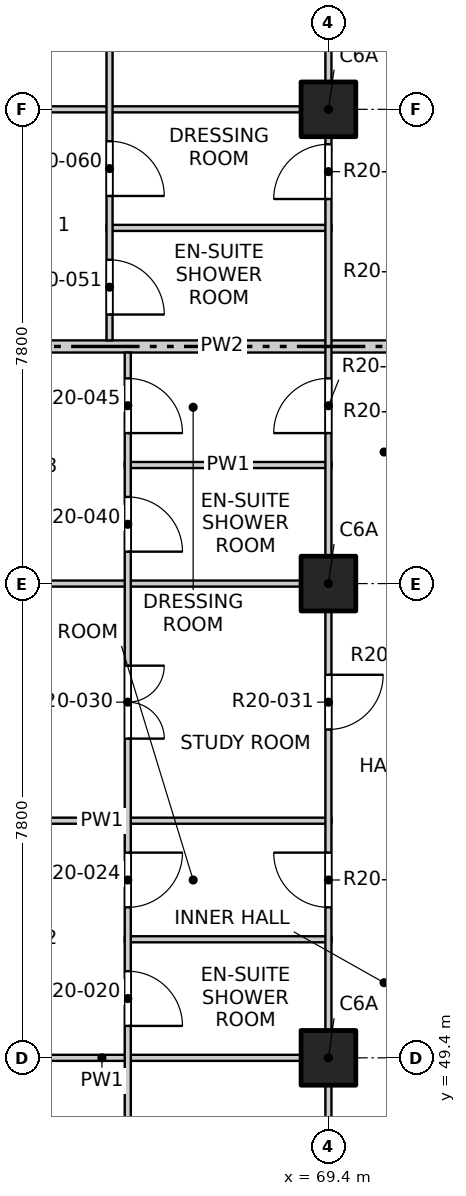
"""IFC4 building model, lengths in metres.
Left out: names, types, materials, properties, quantities, classifications, styles, units other than length and angle.
Written with IfcOpenShell. Run it as: python <this file> out.ifc"""

import sys

from ifc_helpers import new_model, si_unit, direction, frame, frame_2d, origin, origin_2d, place, context, subcontext, project, spatial, rectangle, extrude, element, fill, save


model = new_model("IFC4")
c1 = context("Model", 3, precision=1e-05, world=origin(), true_north=direction((0.0, 1.0)))
c2 = subcontext(c1, "Body", "Model", "MODEL_VIEW")
j1 = project(units=[si_unit("LENGTHUNIT", "METRE"), si_unit("PLANEANGLEUNIT", "RADIAN")], contexts=[c1])
p1 = place(None, origin())
s1 = spatial("IfcSite", under=j1, at=p1, CompositionType="ELEMENT")
p2 = place(p1, origin())
s2 = spatial("IfcBuilding", under=s1, at=p2, CompositionType="ELEMENT")
p3 = place(p2, frame((0.0, 0.0, 210.9)))
s3 = spatial("IfcBuildingStorey", under=s2, at=p3, CompositionType="ELEMENT", Elevation=210.9)
for number, where, z_axis, x_axis in (
    (1, (69.4, 49.4, -0.25), (0.0, 0.0, 1.0), (1.0, 0.0, 0.0)),
    (2, (69.4, 57.2, -0.25), (0.0, 0.0, 1.0), (1.0, 0.0, 0.0)),
    (3, (69.4, 65.0, -0.25), (0.0, 0.0, 1.0), (1.0, 0.0, 0.0)),
):
    element("IfcColumn", number, at=place(p3, frame(where, z_axis=z_axis, x_axis=x_axis)), inside=s3, PredefinedType="COLUMN", context=c2, shape_type="SweptSolid", body=[
        extrude(rectangle(XDim=0.9, YDim=0.9, at=origin_2d()), origin(), (0.0, 0.0, 1.0), 3.4),
    ])
p4 = place(p3, frame((61.9, 49.4, 0.0), z_axis=(0.0, 0.0, 1.0), x_axis=(1.0, 0.0, 0.0)))
e4 = element("IfcWall", 4, at=p4, inside=s3, PredefinedType="PARTITIONING", context=c2, shape_type="SweptSolid", body=[
    extrude(rectangle(XDim=7.55, YDim=0.1, at=frame_2d((3.775, 0.0))), origin(), (0.0, 0.0, 1.0), 3.15),
])
p5 = place(p3, frame((66.05, 51.35, 0.0), z_axis=(0.0, 0.0, 1.0), x_axis=(1.0, 0.0, 0.0)))
e5 = element("IfcWall", 5, at=p5, inside=s3, PredefinedType="PARTITIONING", context=c2, shape_type="SweptSolid", body=[
    extrude(rectangle(XDim=3.4, YDim=0.1, at=frame_2d((1.7, 0.0))), origin(), (0.0, 0.0, 1.0), 3.15),
])
for number, where, z_axis, x_axis in (
    (6, (61.9, 53.3, 0.0), (0.0, 0.0, 1.0), (1.0, 0.0, 0.0)),
    (7, (61.9, 57.2, 0.0), (0.0, 0.0, 1.0), (1.0, 0.0, 0.0)),
):
    element("IfcWall", number, at=place(p3, frame(where, z_axis=z_axis, x_axis=x_axis)), inside=s3, PredefinedType="PARTITIONING", context=c2, shape_type="SweptSolid", body=[
        extrude(rectangle(XDim=7.55, YDim=0.1, at=frame_2d((3.775, 0.0))), origin(), (0.0, 0.0, 1.0), 3.15),
    ])
p6 = place(p3, frame((66.05, 59.15, 0.0), z_axis=(0.0, 0.0, 1.0), x_axis=(1.0, 0.0, 0.0)))
e8 = element("IfcWall", 8, at=p6, inside=s3, PredefinedType="PARTITIONING", context=c2, shape_type="SweptSolid", body=[
    extrude(rectangle(XDim=3.4, YDim=0.1, at=frame_2d((1.7, 0.0))), origin(), (0.0, 0.0, 1.0), 3.15),
])
p7 = place(p3, frame((61.9, 61.1, 0.0), z_axis=(0.0, 0.0, 1.0), x_axis=(1.0, 0.0, 0.0)))
e9 = element("IfcWall", 9, at=p7, inside=s3, PredefinedType="PARTITIONING", context=c2, shape_type="SweptSolid", body=[
    extrude(rectangle(XDim=11.5, YDim=0.2, at=frame_2d((5.75, 0.0))), origin(), (0.0, 0.0, 1.0), 2.55),
])
p8 = place(p3, frame((65.75, 63.05, 0.0), z_axis=(0.0, 0.0, 1.0), x_axis=(1.0, 0.0, 0.0)))
e10 = element("IfcWall", 10, at=p8, inside=s3, PredefinedType="PARTITIONING", context=c2, shape_type="SweptSolid", body=[
    extrude(rectangle(XDim=3.7, YDim=0.1, at=frame_2d((1.85, 0.0))), origin(), (0.0, 0.0, 1.0), 3.15),
])
p9 = place(p3, frame((61.9, 65.0, 0.0), z_axis=(0.0, 0.0, 1.0), x_axis=(1.0, 0.0, 0.0)))
e11 = element("IfcWall", 11, at=p9, inside=s3, PredefinedType="PARTITIONING", context=c2, shape_type="SweptSolid", body=[
    extrude(rectangle(XDim=7.55, YDim=0.1, at=frame_2d((3.775, 0.0))), origin(), (0.0, 0.0, 1.0), 3.15),
])
p10 = place(p3, frame((65.8, 61.2, 0.0), z_axis=(0.0, 0.0, 1.0), x_axis=(0.0, 1.0, 0.0)))
e12 = element("IfcWall", 12, at=p10, inside=s3, PredefinedType="PARTITIONING", context=c2, shape_type="SweptSolid", body=[
    extrude(rectangle(XDim=26.9, YDim=0.1, at=frame_2d((13.45, 0.0))), origin(), (0.0, 0.0, 1.0), 3.15),
])
p11 = place(p10, frame((0.425, 0.0, 0.0)))
e13 = element("IfcOpeningElement", 13, at=p11, cuts=e12, PredefinedType="OPENING", context=c2, shape_type="SweptSolid", body=[
    extrude(rectangle(XDim=0.9, YDim=2.1, at=frame_2d((0.45, 1.05))), frame((0.0, 0.06, 0.0), z_axis=(0.0, -1.0, 0.0), x_axis=(1.0, 0.0, 0.0)), (0.0, 0.0, 1.0), 0.12),
])
p12 = place(p10, frame((2.375, 0.0, 0.0)))
e14 = element("IfcOpeningElement", 14, at=p12, cuts=e12, PredefinedType="OPENING", context=c2, shape_type="SweptSolid", body=[
    extrude(rectangle(XDim=0.9, YDim=2.1, at=frame_2d((0.45, 1.05))), frame((0.0, 0.06, 0.0), z_axis=(0.0, -1.0, 0.0), x_axis=(1.0, 0.0, 0.0)), (0.0, 0.0, 1.0), 0.12),
])
p13 = place(p10, frame((5.15, 0.0, 0.0)))
e15 = element("IfcOpeningElement", 15, at=p13, cuts=e12, PredefinedType="OPENING", context=c2, shape_type="SweptSolid", body=[
    extrude(rectangle(XDim=1.2, YDim=2.1, at=frame_2d((0.6, 1.05))), frame((0.0, 0.06, 0.0), z_axis=(0.0, -1.0, 0.0), x_axis=(1.0, 0.0, 0.0)), (0.0, 0.0, 1.0), 0.12),
])
p14 = place(p10, frame((9.05, 0.0, 0.0)))
e16 = element("IfcOpeningElement", 16, at=p14, cuts=e12, PredefinedType="OPENING", context=c2, shape_type="SweptSolid", body=[
    extrude(rectangle(XDim=1.2, YDim=2.1, at=frame_2d((0.6, 1.05))), frame((0.0, 0.06, 0.0), z_axis=(0.0, -1.0, 0.0), x_axis=(1.0, 0.0, 0.0)), (0.0, 0.0, 1.0), 0.12),
])
p15 = place(p10, frame((12.125, 0.0, 0.0)))
e17 = element("IfcOpeningElement", 17, at=p15, cuts=e12, PredefinedType="OPENING", context=c2, shape_type="SweptSolid", body=[
    extrude(rectangle(XDim=0.9, YDim=2.1, at=frame_2d((0.45, 1.05))), frame((0.0, 0.06, 0.0), z_axis=(0.0, -1.0, 0.0), x_axis=(1.0, 0.0, 0.0)), (0.0, 0.0, 1.0), 0.12),
])
p16 = place(p10, frame((14.075, 0.0, 0.0)))
e18 = element("IfcOpeningElement", 18, at=p16, cuts=e12, PredefinedType="OPENING", context=c2, shape_type="SweptSolid", body=[
    extrude(rectangle(XDim=0.9, YDim=2.1, at=frame_2d((0.45, 1.05))), frame((0.0, 0.06, 0.0), z_axis=(0.0, -1.0, 0.0), x_axis=(1.0, 0.0, 0.0)), (0.0, 0.0, 1.0), 0.12),
])
p17 = place(p10, frame((16.025, 0.0, 0.0)))
e19 = element("IfcOpeningElement", 19, at=p17, cuts=e12, PredefinedType="OPENING", context=c2, shape_type="SweptSolid", body=[
    extrude(rectangle(XDim=0.9, YDim=2.1, at=frame_2d((0.45, 1.05))), frame((0.0, 0.06, 0.0), z_axis=(0.0, -1.0, 0.0), x_axis=(1.0, 0.0, 0.0)), (0.0, 0.0, 1.0), 0.12),
])
p18 = place(p10, frame((17.975, 0.0, 0.0)))
e20 = element("IfcOpeningElement", 20, at=p18, cuts=e12, PredefinedType="OPENING", context=c2, shape_type="SweptSolid", body=[
    extrude(rectangle(XDim=0.9, YDim=2.1, at=frame_2d((0.45, 1.05))), frame((0.0, 0.06, 0.0), z_axis=(0.0, -1.0, 0.0), x_axis=(1.0, 0.0, 0.0)), (0.0, 0.0, 1.0), 0.12),
])
p19 = place(p10, frame((20.75, 0.0, 0.0)))
e21 = element("IfcOpeningElement", 21, at=p19, cuts=e12, PredefinedType="OPENING", context=c2, shape_type="SweptSolid", body=[
    extrude(rectangle(XDim=1.2, YDim=2.1, at=frame_2d((0.6, 1.05))), frame((0.0, 0.06, 0.0), z_axis=(0.0, -1.0, 0.0), x_axis=(1.0, 0.0, 0.0)), (0.0, 0.0, 1.0), 0.12),
])
p20 = place(p10, frame((24.65, 0.0, 0.0)))
e22 = element("IfcOpeningElement", 22, at=p20, cuts=e12, PredefinedType="OPENING", context=c2, shape_type="SweptSolid", body=[
    extrude(rectangle(XDim=1.2, YDim=2.1, at=frame_2d((0.6, 1.05))), frame((0.0, 0.06, 0.0), z_axis=(0.0, -1.0, 0.0), x_axis=(1.0, 0.0, 0.0)), (0.0, 0.0, 1.0), 0.12),
])
p21 = place(p3, frame((66.1, 41.9, 0.0), z_axis=(0.0, 0.0, 1.0), x_axis=(0.0, 1.0, 0.0)))
e23 = element("IfcWall", 23, at=p21, inside=s3, PredefinedType="PARTITIONING", context=c2, shape_type="SweptSolid", body=[
    extrude(rectangle(XDim=19.1, YDim=0.1, at=frame_2d((9.55, 0.0))), origin(), (0.0, 0.0, 1.0), 3.15),
])
p22 = place(p21, frame((1.05, 0.0, 0.0)))
e24 = element("IfcOpeningElement", 24, at=p22, cuts=e23, PredefinedType="OPENING", context=c2, shape_type="SweptSolid", body=[
    extrude(rectangle(XDim=1.2, YDim=2.1, at=frame_2d((0.6, 1.05))), frame((0.0, 0.06, 0.0), z_axis=(0.0, -1.0, 0.0), x_axis=(1.0, 0.0, 0.0)), (0.0, 0.0, 1.0), 0.12),
])
p23 = place(p21, frame((4.95, 0.0, 0.0)))
e25 = element("IfcOpeningElement", 25, at=p23, cuts=e23, PredefinedType="OPENING", context=c2, shape_type="SweptSolid", body=[
    extrude(rectangle(XDim=1.2, YDim=2.1, at=frame_2d((0.6, 1.05))), frame((0.0, 0.06, 0.0), z_axis=(0.0, -1.0, 0.0), x_axis=(1.0, 0.0, 0.0)), (0.0, 0.0, 1.0), 0.12),
])
p24 = place(p21, frame((8.025, 0.0, 0.0)))
e26 = element("IfcOpeningElement", 26, at=p24, cuts=e23, PredefinedType="OPENING", context=c2, shape_type="SweptSolid", body=[
    extrude(rectangle(XDim=0.9, YDim=2.1, at=frame_2d((0.45, 1.05))), frame((0.0, 0.06, 0.0), z_axis=(0.0, -1.0, 0.0), x_axis=(1.0, 0.0, 0.0)), (0.0, 0.0, 1.0), 0.12),
])
p25 = place(p21, frame((9.975, 0.0, 0.0)))
e27 = element("IfcOpeningElement", 27, at=p25, cuts=e23, PredefinedType="OPENING", context=c2, shape_type="SweptSolid", body=[
    extrude(rectangle(XDim=0.9, YDim=2.1, at=frame_2d((0.45, 1.05))), frame((0.0, 0.06, 0.0), z_axis=(0.0, -1.0, 0.0), x_axis=(1.0, 0.0, 0.0)), (0.0, 0.0, 1.0), 0.12),
])
p26 = place(p21, frame((12.75, 0.0, 0.0)))
e28 = element("IfcOpeningElement", 28, at=p26, cuts=e23, PredefinedType="OPENING", context=c2, shape_type="SweptSolid", body=[
    extrude(rectangle(XDim=1.2, YDim=2.1, at=frame_2d((0.6, 1.05))), frame((0.0, 0.06, 0.0), z_axis=(0.0, -1.0, 0.0), x_axis=(1.0, 0.0, 0.0)), (0.0, 0.0, 1.0), 0.12),
])
p27 = place(p21, frame((15.825, 0.0, 0.0)))
e29 = element("IfcOpeningElement", 29, at=p27, cuts=e23, PredefinedType="OPENING", context=c2, shape_type="SweptSolid", body=[
    extrude(rectangle(XDim=0.9, YDim=2.1, at=frame_2d((0.45, 1.05))), frame((0.0, 0.06, 0.0), z_axis=(0.0, -1.0, 0.0), x_axis=(1.0, 0.0, 0.0)), (0.0, 0.0, 1.0), 0.12),
])
p28 = place(p21, frame((17.775, 0.0, 0.0)))
e30 = element("IfcOpeningElement", 30, at=p28, cuts=e23, PredefinedType="OPENING", context=c2, shape_type="SweptSolid", body=[
    extrude(rectangle(XDim=0.9, YDim=2.1, at=frame_2d((0.45, 1.05))), frame((0.0, 0.06, 0.0), z_axis=(0.0, -1.0, 0.0), x_axis=(1.0, 0.0, 0.0)), (0.0, 0.0, 1.0), 0.12),
])
p29 = place(p3, frame((69.4, 41.9, 0.0), z_axis=(0.0, 0.0, 1.0), x_axis=(0.0, 1.0, 0.0)))
e31 = element("IfcWall", 31, at=p29, inside=s3, PredefinedType="PARTITIONING", context=c2, shape_type="SweptSolid", body=[
    extrude(rectangle(XDim=46.2, YDim=0.1, at=frame_2d((23.1, 0.0))), origin(), (0.0, 0.0, 1.0), 3.15),
])
p30 = place(p29, frame((1.2, 0.0, 0.0)))
e32 = element("IfcOpeningElement", 32, at=p30, cuts=e31, PredefinedType="OPENING", context=c2, shape_type="SweptSolid", body=[
    extrude(rectangle(XDim=0.9, YDim=2.1, at=frame_2d((0.45, 1.05))), frame((0.0, 0.06, 0.0), z_axis=(0.0, -1.0, 0.0), x_axis=(1.0, 0.0, 0.0)), (0.0, 0.0, 1.0), 0.12),
])
p31 = place(p29, frame((5.1, 0.0, 0.0)))
e33 = element("IfcOpeningElement", 33, at=p31, cuts=e31, PredefinedType="OPENING", context=c2, shape_type="SweptSolid", body=[
    extrude(rectangle(XDim=0.9, YDim=2.1, at=frame_2d((0.45, 1.05))), frame((0.0, 0.06, 0.0), z_axis=(0.0, -1.0, 0.0), x_axis=(1.0, 0.0, 0.0)), (0.0, 0.0, 1.0), 0.12),
])
p32 = place(p29, frame((9.975, 0.0, 0.0)))
e34 = element("IfcOpeningElement", 34, at=p32, cuts=e31, PredefinedType="OPENING", context=c2, shape_type="SweptSolid", body=[
    extrude(rectangle(XDim=0.9, YDim=2.1, at=frame_2d((0.45, 1.05))), frame((0.0, 0.06, 0.0), z_axis=(0.0, -1.0, 0.0), x_axis=(1.0, 0.0, 0.0)), (0.0, 0.0, 1.0), 0.12),
])
p33 = place(p29, frame((12.9, 0.0, 0.0)))
e35 = element("IfcOpeningElement", 35, at=p33, cuts=e31, PredefinedType="OPENING", context=c2, shape_type="SweptSolid", body=[
    extrude(rectangle(XDim=0.9, YDim=2.1, at=frame_2d((0.45, 1.05))), frame((0.0, 0.06, 0.0), z_axis=(0.0, -1.0, 0.0), x_axis=(1.0, 0.0, 0.0)), (0.0, 0.0, 1.0), 0.12),
])
p34 = place(p29, frame((17.775, 0.0, 0.0)))
e36 = element("IfcOpeningElement", 36, at=p34, cuts=e31, PredefinedType="OPENING", context=c2, shape_type="SweptSolid", body=[
    extrude(rectangle(XDim=0.9, YDim=2.1, at=frame_2d((0.45, 1.05))), frame((0.0, 0.06, 0.0), z_axis=(0.0, -1.0, 0.0), x_axis=(1.0, 0.0, 0.0)), (0.0, 0.0, 1.0), 0.12),
])
p35 = place(p29, frame((21.625, 0.0, 0.0)))
e37 = element("IfcOpeningElement", 37, at=p35, cuts=e31, PredefinedType="OPENING", context=c2, shape_type="SweptSolid", body=[
    extrude(rectangle(XDim=0.9, YDim=2.1, at=frame_2d((0.45, 1.05))), frame((0.0, 0.06, 0.0), z_axis=(0.0, -1.0, 0.0), x_axis=(1.0, 0.0, 0.0)), (0.0, 0.0, 1.0), 0.12),
])
p36 = place(p29, frame((24.6, 0.0, 0.0)))
e38 = element("IfcOpeningElement", 38, at=p36, cuts=e31, PredefinedType="OPENING", context=c2, shape_type="SweptSolid", body=[
    extrude(rectangle(XDim=0.9, YDim=2.1, at=frame_2d((0.45, 1.05))), frame((0.0, 0.06, 0.0), z_axis=(0.0, -1.0, 0.0), x_axis=(1.0, 0.0, 0.0)), (0.0, 0.0, 1.0), 0.12),
])
p37 = place(p29, frame((28.5, 0.0, 0.0)))
e39 = element("IfcOpeningElement", 39, at=p37, cuts=e31, PredefinedType="OPENING", context=c2, shape_type="SweptSolid", body=[
    extrude(rectangle(XDim=0.9, YDim=2.1, at=frame_2d((0.45, 1.05))), frame((0.0, 0.06, 0.0), z_axis=(0.0, -1.0, 0.0), x_axis=(1.0, 0.0, 0.0)), (0.0, 0.0, 1.0), 0.12),
])
p38 = place(p29, frame((33.375, 0.0, 0.0)))
e40 = element("IfcOpeningElement", 40, at=p38, cuts=e31, PredefinedType="OPENING", context=c2, shape_type="SweptSolid", body=[
    extrude(rectangle(XDim=0.9, YDim=2.1, at=frame_2d((0.45, 1.05))), frame((0.0, 0.06, 0.0), z_axis=(0.0, -1.0, 0.0), x_axis=(1.0, 0.0, 0.0)), (0.0, 0.0, 1.0), 0.12),
])
p39 = place(p29, frame((37.225, 0.0, 0.0)))
e41 = element("IfcOpeningElement", 41, at=p39, cuts=e31, PredefinedType="OPENING", context=c2, shape_type="SweptSolid", body=[
    extrude(rectangle(XDim=0.9, YDim=2.1, at=frame_2d((0.45, 1.05))), frame((0.0, 0.06, 0.0), z_axis=(0.0, -1.0, 0.0), x_axis=(1.0, 0.0, 0.0)), (0.0, 0.0, 1.0), 0.12),
])
p40 = place(p29, frame((40.2, 0.0, 0.0)))
e42 = element("IfcOpeningElement", 42, at=p40, cuts=e31, PredefinedType="OPENING", context=c2, shape_type="SweptSolid", body=[
    extrude(rectangle(XDim=0.9, YDim=2.1, at=frame_2d((0.45, 1.05))), frame((0.0, 0.06, 0.0), z_axis=(0.0, -1.0, 0.0), x_axis=(1.0, 0.0, 0.0)), (0.0, 0.0, 1.0), 0.12),
])
p41 = place(p29, frame((44.1, 0.0, 0.0)))
e43 = element("IfcOpeningElement", 43, at=p41, cuts=e31, PredefinedType="OPENING", context=c2, shape_type="SweptSolid", body=[
    extrude(rectangle(XDim=0.9, YDim=2.1, at=frame_2d((0.45, 1.05))), frame((0.0, 0.06, 0.0), z_axis=(0.0, -1.0, 0.0), x_axis=(1.0, 0.0, 0.0)), (0.0, 0.0, 1.0), 0.12),
])
p42 = place(p24, origin())
e44 = element("IfcDoor", 44, at=p42, inside=s3, OperationType="SINGLE_SWING_RIGHT", PredefinedType="DOOR", context=c2, shape_type="SweptSolid", body=[
    extrude(rectangle(XDim=0.9, YDim=2.1, at=frame_2d((0.45, 1.05))), frame((0.0, 0.025, 0.0), z_axis=(0.0, -1.0, 0.0), x_axis=(1.0, 0.0, 0.0)), (0.0, 0.0, 1.0), 0.05),
])
fill(e26, e44)
p43 = place(p25, origin())
e45 = element("IfcDoor", 45, at=p43, inside=s3, OperationType="SINGLE_SWING_LEFT", PredefinedType="DOOR", context=c2, shape_type="SweptSolid", body=[
    extrude(rectangle(XDim=0.9, YDim=2.1, at=frame_2d((0.45, 1.05))), frame((0.0, 0.025, 0.0), z_axis=(0.0, -1.0, 0.0), x_axis=(1.0, 0.0, 0.0)), (0.0, 0.0, 1.0), 0.05),
])
fill(e27, e45)
p44 = place(p32, origin())
e46 = element("IfcDoor", 46, at=p44, inside=s3, OperationType="SINGLE_SWING_RIGHT", PredefinedType="DOOR", context=c2, shape_type="SweptSolid", body=[
    extrude(rectangle(XDim=0.9, YDim=2.1, at=frame_2d((0.45, 1.05))), frame((0.0, 0.025, 0.0), z_axis=(0.0, -1.0, 0.0), x_axis=(1.0, 0.0, 0.0)), (0.0, 0.0, 1.0), 0.05),
])
fill(e34, e46)
p45 = place(p26, origin())
e47 = element("IfcDoor", 47, at=p45, inside=s3, OperationType="DOUBLE_DOOR_SINGLE_SWING", PredefinedType="DOOR", context=c2, shape_type="SweptSolid", body=[
    extrude(rectangle(XDim=1.2, YDim=2.1, at=frame_2d((0.6, 1.05))), frame((0.0, 0.025, 0.0), z_axis=(0.0, -1.0, 0.0), x_axis=(1.0, 0.0, 0.0)), (0.0, 0.0, 1.0), 0.05),
])
fill(e28, e47)
p46 = place(p33, origin())
e48 = element("IfcDoor", 48, at=p46, inside=s3, OperationType="SINGLE_SWING_LEFT", PredefinedType="DOOR", context=c2, shape_type="SweptSolid", body=[
    extrude(rectangle(XDim=0.9, YDim=2.1, at=frame_2d((0.45, 1.05))), frame((0.0, 0.025, 0.0), z_axis=(0.0, -1.0, 0.0), x_axis=(1.0, 0.0, 0.0)), (0.0, 0.0, 1.0), 0.05),
])
fill(e35, e48)
p47 = place(p27, origin())
e49 = element("IfcDoor", 49, at=p47, inside=s3, OperationType="SINGLE_SWING_RIGHT", PredefinedType="DOOR", context=c2, shape_type="SweptSolid", body=[
    extrude(rectangle(XDim=0.9, YDim=2.1, at=frame_2d((0.45, 1.05))), frame((0.0, 0.025, 0.0), z_axis=(0.0, -1.0, 0.0), x_axis=(1.0, 0.0, 0.0)), (0.0, 0.0, 1.0), 0.05),
])
fill(e29, e49)
p48 = place(p28, origin())
e50 = element("IfcDoor", 50, at=p48, inside=s3, OperationType="SINGLE_SWING_RIGHT", PredefinedType="DOOR", context=c2, shape_type="SweptSolid", body=[
    extrude(rectangle(XDim=0.9, YDim=2.1, at=frame_2d((0.45, 1.05))), frame((0.0, 0.025, 0.0), z_axis=(0.0, -1.0, 0.0), x_axis=(1.0, 0.0, 0.0)), (0.0, 0.0, 1.0), 0.05),
])
fill(e30, e50)
p49 = place(p34, origin())
e51 = element("IfcDoor", 51, at=p49, inside=s3, OperationType="SINGLE_SWING_LEFT", PredefinedType="DOOR", context=c2, shape_type="SweptSolid", body=[
    extrude(rectangle(XDim=0.9, YDim=2.1, at=frame_2d((0.45, 1.05))), frame((0.0, 0.025, 0.0), z_axis=(0.0, -1.0, 0.0), x_axis=(1.0, 0.0, 0.0)), (0.0, 0.0, 1.0), 0.05),
])
fill(e36, e51)
p50 = place(p11, origin())
e52 = element("IfcDoor", 52, at=p50, inside=s3, OperationType="SINGLE_SWING_RIGHT", PredefinedType="DOOR", context=c2, shape_type="SweptSolid", body=[
    extrude(rectangle(XDim=0.9, YDim=2.1, at=frame_2d((0.45, 1.05))), frame((0.0, 0.025, 0.0), z_axis=(0.0, -1.0, 0.0), x_axis=(1.0, 0.0, 0.0)), (0.0, 0.0, 1.0), 0.05),
])
fill(e13, e52)
p51 = place(p35, origin())
e53 = element("IfcDoor", 53, at=p51, inside=s3, OperationType="SINGLE_SWING_LEFT", PredefinedType="DOOR", context=c2, shape_type="SweptSolid", body=[
    extrude(rectangle(XDim=0.9, YDim=2.1, at=frame_2d((0.45, 1.05))), frame((0.0, 0.025, 0.0), z_axis=(0.0, -1.0, 0.0), x_axis=(1.0, 0.0, 0.0)), (0.0, 0.0, 1.0), 0.05),
])
fill(e37, e53)
p52 = place(p12, origin())
e54 = element("IfcDoor", 54, at=p52, inside=s3, OperationType="SINGLE_SWING_RIGHT", PredefinedType="DOOR", context=c2, shape_type="SweptSolid", body=[
    extrude(rectangle(XDim=0.9, YDim=2.1, at=frame_2d((0.45, 1.05))), frame((0.0, 0.025, 0.0), z_axis=(0.0, -1.0, 0.0), x_axis=(1.0, 0.0, 0.0)), (0.0, 0.0, 1.0), 0.05),
])
fill(e14, e54)
save(model, sys.argv[1])
